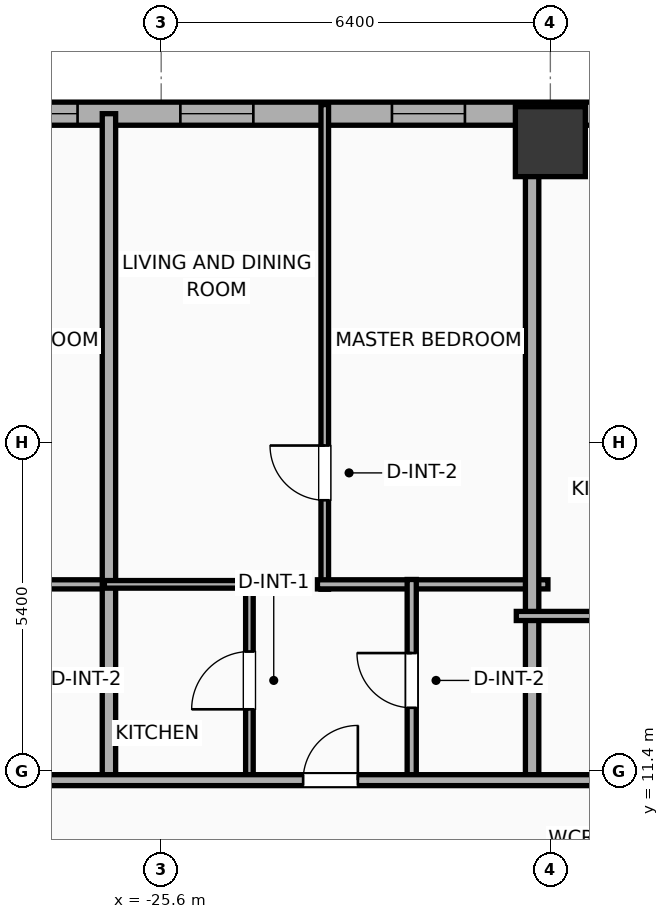
"""IFC4 building model, lengths in metres.
Left out: names, types, materials, properties, quantities, classifications, styles, units other than length and angle.
Written with IfcOpenShell. Run it as: python <this file> out.ifc"""

import sys

from ifc_helpers import new_model, si_unit, direction, frame, frame_2d, origin, origin_2d, place, context, subcontext, project, spatial, rectangle, hollow_rectangle, extrude, element, fill, save


model = new_model("IFC4")
c1 = context("Model", 3, precision=1e-05, world=origin(), true_north=direction((0.0, 1.0)))
c2 = subcontext(c1, "Body", "Model", "MODEL_VIEW")
j1 = project(units=[si_unit("LENGTHUNIT", "METRE"), si_unit("PLANEANGLEUNIT", "RADIAN")], contexts=[c1])
p1 = place(None, origin())
s1 = spatial("IfcSite", under=j1, at=p1, CompositionType="ELEMENT")
p2 = place(p1, origin())
s2 = spatial("IfcBuilding", under=s1, at=p2, CompositionType="ELEMENT")
p3 = place(p2, frame((0.0, 0.0, 76.7)))
s3 = spatial("IfcBuildingStorey", under=s2, at=p3, CompositionType="ELEMENT", Elevation=76.7)
p4 = place(p3, frame((-19.2, 21.75, 0.0), z_axis=(0.0, 0.0, 1.0), x_axis=(1.0, 0.0, 0.0)))
e1 = element("IfcColumn", 1, at=p4, inside=s3, PredefinedType="COLUMN", context=c2, shape_type="SweptSolid", body=[
    extrude(hollow_rectangle(XDim=1.15, YDim=1.15, WallThickness=0.04, at=origin_2d()), origin(), (0.0, 0.0, 1.0), 3.9),
])
p5 = place(p3, frame((-29.581, 22.21, 0.0), z_axis=(0.0, 0.0, 1.0), x_axis=(1.0, 0.0, 0.0)))
e2 = element("IfcWall", 2, at=p5, inside=s3, PredefinedType="ELEMENTEDWALL", context=c2, shape_type="SweptSolid", body=[
    extrude(rectangle(XDim=51.963, YDim=0.38, at=frame_2d((25.981, 0.0))), origin(), (0.0, 0.0, 1.0), 3.6),
])
p6 = place(p5, frame((25.631, 0.0, 0.75)))
e3 = element("IfcOpeningElement", 3, at=p6, cuts=e2, PredefinedType="OPENING", context=c2, shape_type="SweptSolid", body=[
    extrude(rectangle(XDim=2.4, YDim=2.1, at=frame_2d((1.2, 1.05))), frame((0.0, 0.2, 0.0), z_axis=(0.0, -1.0, 0.0), x_axis=(1.0, 0.0, 0.0)), (0.0, 0.0, 1.0), 0.4),
])
p7 = place(p5, frame((42.952, 0.0, 0.75)))
e4 = element("IfcOpeningElement", 4, at=p7, cuts=e2, PredefinedType="OPENING", context=c2, shape_type="SweptSolid", body=[
    extrude(rectangle(XDim=2.4, YDim=2.1, at=frame_2d((1.2, 1.05))), frame((0.0, 0.2, 0.0), z_axis=(0.0, -1.0, 0.0), x_axis=(1.0, 0.0, 0.0)), (0.0, 0.0, 1.0), 0.4),
])
p8 = place(p5, frame((1.406, 0.0, 0.75)))
e5 = element("IfcOpeningElement", 5, at=p8, cuts=e2, PredefinedType="OPENING", context=c2, shape_type="SweptSolid", body=[
    extrude(rectangle(XDim=1.2, YDim=2.05, at=frame_2d((0.6, 1.025))), frame((0.0, 0.2, 0.0), z_axis=(0.0, -1.0, 0.0), x_axis=(1.0, 0.0, 0.0)), (0.0, 0.0, 1.0), 0.4),
])
p9 = place(p5, frame((4.297, 0.0, 0.75)))
e6 = element("IfcOpeningElement", 6, at=p9, cuts=e2, PredefinedType="OPENING", context=c2, shape_type="SweptSolid", body=[
    extrude(rectangle(XDim=1.2, YDim=2.05, at=frame_2d((0.6, 1.025))), frame((0.0, 0.2, 0.0), z_axis=(0.0, -1.0, 0.0), x_axis=(1.0, 0.0, 0.0)), (0.0, 0.0, 1.0), 0.4),
])
p10 = place(p5, frame((7.776, 0.0, 0.75)))
e7 = element("IfcOpeningElement", 7, at=p10, cuts=e2, PredefinedType="OPENING", context=c2, shape_type="SweptSolid", body=[
    extrude(rectangle(XDim=1.2, YDim=2.05, at=frame_2d((0.6, 1.025))), frame((0.0, 0.2, 0.0), z_axis=(0.0, -1.0, 0.0), x_axis=(1.0, 0.0, 0.0)), (0.0, 0.0, 1.0), 0.4),
])
p11 = place(p5, frame((14.036, 0.0, 0.75)))
e8 = element("IfcOpeningElement", 8, at=p11, cuts=e2, PredefinedType="OPENING", context=c2, shape_type="SweptSolid", body=[
    extrude(rectangle(XDim=1.2, YDim=2.05, at=frame_2d((0.6, 1.025))), frame((0.0, 0.2, 0.0), z_axis=(0.0, -1.0, 0.0), x_axis=(1.0, 0.0, 0.0)), (0.0, 0.0, 1.0), 0.4),
])
p12 = place(p5, frame((11.146, 0.0, 0.75)))
e9 = element("IfcOpeningElement", 9, at=p12, cuts=e2, PredefinedType="OPENING", context=c2, shape_type="SweptSolid", body=[
    extrude(rectangle(XDim=1.2, YDim=2.05, at=frame_2d((0.6, 1.025))), frame((0.0, 0.2, 0.0), z_axis=(0.0, -1.0, 0.0), x_axis=(1.0, 0.0, 0.0)), (0.0, 0.0, 1.0), 0.4),
])
p13 = place(p5, frame((18.751, 0.0, 0.75)))
e10 = element("IfcOpeningElement", 10, at=p13, cuts=e2, PredefinedType="OPENING", context=c2, shape_type="SweptSolid", body=[
    extrude(rectangle(XDim=1.2, YDim=2.05, at=frame_2d((0.6, 1.025))), frame((0.0, 0.2, 0.0), z_axis=(0.0, -1.0, 0.0), x_axis=(1.0, 0.0, 0.0)), (0.0, 0.0, 1.0), 0.4),
])
p14 = place(p5, frame((23.647, 0.0, 0.75)))
e11 = element("IfcOpeningElement", 11, at=p14, cuts=e2, PredefinedType="OPENING", context=c2, shape_type="SweptSolid", body=[
    extrude(rectangle(XDim=1.2, YDim=2.05, at=frame_2d((0.6, 1.025))), frame((0.0, 0.2, 0.0), z_axis=(0.0, -1.0, 0.0), x_axis=(1.0, 0.0, 0.0)), (0.0, 0.0, 1.0), 0.4),
])
p15 = place(p5, frame((32.006, 0.0, 0.75)))
e12 = element("IfcOpeningElement", 12, at=p15, cuts=e2, PredefinedType="OPENING", context=c2, shape_type="SweptSolid", body=[
    extrude(rectangle(XDim=1.2, YDim=2.05, at=frame_2d((0.6, 1.025))), frame((0.0, 0.2, 0.0), z_axis=(0.0, -1.0, 0.0), x_axis=(1.0, 0.0, 0.0)), (0.0, 0.0, 1.0), 0.4),
])
p16 = place(p5, frame((34.176, 0.0, 0.75)))
e13 = element("IfcOpeningElement", 13, at=p16, cuts=e2, PredefinedType="OPENING", context=c2, shape_type="SweptSolid", body=[
    extrude(rectangle(XDim=1.2, YDim=2.05, at=frame_2d((0.6, 1.025))), frame((0.0, 0.2, 0.0), z_axis=(0.0, -1.0, 0.0), x_axis=(1.0, 0.0, 0.0)), (0.0, 0.0, 1.0), 0.4),
])
p17 = place(p5, frame((37.063, 0.0, 0.75)))
e14 = element("IfcOpeningElement", 14, at=p17, cuts=e2, PredefinedType="OPENING", context=c2, shape_type="SweptSolid", body=[
    extrude(rectangle(XDim=1.2, YDim=2.05, at=frame_2d((0.6, 1.025))), frame((0.0, 0.2, 0.0), z_axis=(0.0, -1.0, 0.0), x_axis=(1.0, 0.0, 0.0)), (0.0, 0.0, 1.0), 0.4),
])
p18 = place(p5, frame((39.509, 0.0, 0.75)))
e15 = element("IfcOpeningElement", 15, at=p18, cuts=e2, PredefinedType="OPENING", context=c2, shape_type="SweptSolid", body=[
    extrude(rectangle(XDim=1.2, YDim=2.05, at=frame_2d((0.6, 1.025))), frame((0.0, 0.2, 0.0), z_axis=(0.0, -1.0, 0.0), x_axis=(1.0, 0.0, 0.0)), (0.0, 0.0, 1.0), 0.4),
])
p19 = place(p5, frame((46.921, 0.0, 0.75)))
e16 = element("IfcOpeningElement", 16, at=p19, cuts=e2, PredefinedType="OPENING", context=c2, shape_type="SweptSolid", body=[
    extrude(rectangle(XDim=1.2, YDim=2.05, at=frame_2d((0.6, 1.025))), frame((0.0, 0.2, 0.0), z_axis=(0.0, -1.0, 0.0), x_axis=(1.0, 0.0, 0.0)), (0.0, 0.0, 1.0), 0.4),
])
p20 = place(p5, frame((49.55, 0.0, 0.75)))
e17 = element("IfcOpeningElement", 17, at=p20, cuts=e2, PredefinedType="OPENING", context=c2, shape_type="SweptSolid", body=[
    extrude(rectangle(XDim=1.2, YDim=2.05, at=frame_2d((0.6, 1.025))), frame((0.0, 0.2, 0.0), z_axis=(0.0, -1.0, 0.0), x_axis=(1.0, 0.0, 0.0)), (0.0, 0.0, 1.0), 0.4),
])
p21 = place(p3, frame((-29.989, 14.47, 0.0), z_axis=(0.0, 0.0, 1.0), x_axis=(1.0, 0.0, 0.0)))
e18 = element("IfcWall", 18, at=p21, inside=s3, PredefinedType="PLUMBINGWALL", context=c2, shape_type="SweptSolid", body=[
    extrude(rectangle(XDim=3.605, YDim=0.15, at=frame_2d((1.802, 0.0))), origin(), (0.0, 0.0, 1.0), 3.6),
])
p22 = place(p3, frame((-26.459, 11.17, 0.0), z_axis=(0.0, 0.0, 1.0), x_axis=(0.0, 1.0, 0.0)))
e19 = element("IfcWall", 19, at=p22, inside=s3, PredefinedType="PARTITIONING", context=c2, shape_type="SweptSolid", body=[
    extrude(rectangle(XDim=11.04, YDim=0.22, at=frame_2d((5.52, 0.0))), origin(), (0.0, 0.0, 1.0), 3.6),
])
p23 = place(p3, frame((-22.91, 14.39, 0.0), z_axis=(0.0, 0.0, 1.0), x_axis=(0.0, 1.0, 0.0)))
e20 = element("IfcWall", 20, at=p23, inside=s3, PredefinedType="PARTITIONING", context=c2, shape_type="SweptSolid", body=[
    extrude(rectangle(XDim=7.97, YDim=0.125, at=frame_2d((3.985, 0.0))), origin(), (0.0, 0.0, 1.0), 3.6),
])
p24 = place(p23, frame((1.463, 0.0, 0.0)))
e21 = element("IfcOpeningElement", 21, at=p24, cuts=e20, PredefinedType="OPENING", context=c2, shape_type="SweptSolid", body=[
    extrude(rectangle(XDim=0.9, YDim=2.05, at=frame_2d((0.45, 1.025))), frame((0.0, 0.073, 0.0), z_axis=(0.0, -1.0, 0.0), x_axis=(1.0, 0.0, 0.0)), (0.0, 0.0, 1.0), 0.145),
])
p25 = place(p3, frame((-23.03, 14.47, 0.0), z_axis=(0.0, 0.0, 1.0), x_axis=(1.0, 0.0, 0.0)))
e22 = element("IfcWall", 22, at=p25, inside=s3, PredefinedType="PLUMBINGWALL", context=c2, shape_type="SweptSolid", body=[
    extrude(rectangle(XDim=3.79, YDim=0.15, at=frame_2d((1.895, 0.0))), origin(), (0.0, 0.0, 1.0), 3.6),
])
p26 = place(p3, frame((-24.149, 11.23, 0.0), z_axis=(0.0, 0.0, 1.0), x_axis=(0.0, 1.0, 0.0)))
e23 = element("IfcWall", 23, at=p26, inside=s3, PredefinedType="PARTITIONING", context=c2, shape_type="SweptSolid", body=[
    extrude(rectangle(XDim=3.32, YDim=0.125, at=frame_2d((1.66, 0.0))), origin(), (0.0, 0.0, 1.0), 3.6),
])
p27 = place(p26, frame((1.185, 0.0, 0.0)))
e24 = element("IfcOpeningElement", 24, at=p27, cuts=e23, PredefinedType="OPENING", context=c2, shape_type="SweptSolid", body=[
    extrude(rectangle(XDim=0.95, YDim=2.05, at=frame_2d((0.475, 1.025))), frame((0.0, 0.073, 0.0), z_axis=(0.0, -1.0, 0.0), x_axis=(1.0, 0.0, 0.0)), (0.0, 0.0, 1.0), 0.145),
])
p28 = place(p3, frame((-26.534, 14.47, 0.0), z_axis=(0.0, 0.0, 1.0), x_axis=(1.0, 0.0, 0.0)))
e25 = element("IfcWall", 25, at=p28, inside=s3, PredefinedType="PARTITIONING", context=c2, shape_type="SweptSolid", body=[
    extrude(rectangle(XDim=2.505, YDim=0.125, at=frame_2d((1.252, 0.0))), origin(), (0.0, 0.0, 1.0), 3.6),
])
p29 = place(p3, frame((-21.48, 11.23, 0.0), z_axis=(0.0, 0.0, 1.0), x_axis=(0.0, 1.0, 0.0)))
e26 = element("IfcWall", 26, at=p29, inside=s3, PredefinedType="PLUMBINGWALL", context=c2, shape_type="SweptSolid", body=[
    extrude(rectangle(XDim=3.32, YDim=0.15, at=frame_2d((1.66, 0.0))), origin(), (0.0, 0.0, 1.0), 3.6),
])
p30 = place(p29, frame((1.21, 0.0, 0.0)))
e27 = element("IfcOpeningElement", 27, at=p30, cuts=e26, PredefinedType="OPENING", context=c2, shape_type="SweptSolid", body=[
    extrude(rectangle(XDim=0.9, YDim=2.05, at=frame_2d((0.45, 1.025))), frame((0.0, 0.085, 0.0), z_axis=(0.0, -1.0, 0.0), x_axis=(1.0, 0.0, 0.0)), (0.0, 0.0, 1.0), 0.17),
])
p31 = place(p3, frame((-19.5, 11.17, 0.0), z_axis=(0.0, 0.0, 1.0), x_axis=(0.0, 1.0, 0.0)))
e28 = element("IfcWall", 28, at=p31, inside=s3, PredefinedType="PARTITIONING", context=c2, shape_type="SweptSolid", body=[
    extrude(rectangle(XDim=11.04, YDim=0.22, at=frame_2d((5.52, 0.0))), origin(), (0.0, 0.0, 1.0), 2.89),
])
p32 = place(p3, frame((-19.76, 13.95, 0.0), z_axis=(0.0, 0.0, 1.0), x_axis=(1.0, 0.0, 0.0)))
e29 = element("IfcWall", 29, at=p32, inside=s3, PredefinedType="PLUMBINGWALL", context=c2, shape_type="SweptSolid", body=[
    extrude(rectangle(XDim=2.95, YDim=0.15, at=frame_2d((1.475, 0.0))), origin(), (0.0, 0.0, 1.0), 3.6),
])
p33 = place(p3, frame((-33.41, 11.25, 0.0), z_axis=(0.0, 0.0, 1.0), x_axis=(1.0, 0.0, 0.0)))
e30 = element("IfcWall", 30, at=p33, inside=s3, PredefinedType="PARTITIONING", context=c2, shape_type="SweptSolid", body=[
    extrude(rectangle(XDim=59.62, YDim=0.18, at=frame_2d((29.81, 0.0))), origin(), (0.0, 0.0, 1.0), 3.6),
])
p34 = place(p33, frame((3.157, 0.0, 0.0)))
e31 = element("IfcOpeningElement", 31, at=p34, cuts=e30, PredefinedType="OPENING", context=c2, shape_type="SweptSolid", body=[
    extrude(rectangle(XDim=0.9, YDim=2.05, at=frame_2d((0.45, 1.025))), frame((0.0, 0.1, 0.0), z_axis=(0.0, -1.0, 0.0), x_axis=(1.0, 0.0, 0.0)), (0.0, 0.0, 1.0), 0.2),
])
p35 = place(p33, frame((10.145, 0.0, 0.0)))
e32 = element("IfcOpeningElement", 32, at=p35, cuts=e30, PredefinedType="OPENING", context=c2, shape_type="SweptSolid", body=[
    extrude(rectangle(XDim=0.9, YDim=2.05, at=frame_2d((0.45, 1.025))), frame((0.0, 0.1, 0.0), z_axis=(0.0, -1.0, 0.0), x_axis=(1.0, 0.0, 0.0)), (0.0, 0.0, 1.0), 0.2),
])
p36 = place(p33, frame((17.86, 0.0, 0.0)))
e33 = element("IfcOpeningElement", 33, at=p36, cuts=e30, PredefinedType="OPENING", context=c2, shape_type="SweptSolid", body=[
    extrude(rectangle(XDim=1.15, YDim=2.05, at=frame_2d((0.575, 1.025))), frame((0.0, 0.1, 0.0), z_axis=(0.0, -1.0, 0.0), x_axis=(1.0, 0.0, 0.0)), (0.0, 0.0, 1.0), 0.2),
])
p37 = place(p33, frame((23.338, 0.0, 0.0)))
e34 = element("IfcOpeningElement", 34, at=p37, cuts=e30, PredefinedType="OPENING", context=c2, shape_type="SweptSolid", body=[
    extrude(rectangle(XDim=0.9, YDim=2.05, at=frame_2d((0.45, 1.025))), frame((0.0, 0.1, 0.0), z_axis=(0.0, -1.0, 0.0), x_axis=(1.0, 0.0, 0.0)), (0.0, 0.0, 1.0), 0.2),
])
p38 = place(p33, frame((30.719, 0.0, 0.0)))
e35 = element("IfcOpeningElement", 35, at=p38, cuts=e30, PredefinedType="OPENING", context=c2, shape_type="SweptSolid", body=[
    extrude(rectangle(XDim=1.15, YDim=2.05, at=frame_2d((0.575, 1.025))), frame((0.0, 0.1, 0.0), z_axis=(0.0, -1.0, 0.0), x_axis=(1.0, 0.0, 0.0)), (0.0, 0.0, 1.0), 0.2),
])
p39 = place(p33, frame((34.81, 0.0, 0.0)))
e36 = element("IfcOpeningElement", 36, at=p39, cuts=e30, PredefinedType="OPENING", context=c2, shape_type="SweptSolid", body=[
    extrude(rectangle(XDim=1.15, YDim=2.05, at=frame_2d((0.575, 1.025))), frame((0.0, 0.1, 0.0), z_axis=(0.0, -1.0, 0.0), x_axis=(1.0, 0.0, 0.0)), (0.0, 0.0, 1.0), 0.2),
])
p40 = place(p33, frame((42.912, 0.0, 0.0)))
e37 = element("IfcOpeningElement", 37, at=p40, cuts=e30, PredefinedType="OPENING", context=c2, shape_type="SweptSolid", body=[
    extrude(rectangle(XDim=0.9, YDim=2.05, at=frame_2d((0.45, 1.025))), frame((0.0, 0.1, 0.0), z_axis=(0.0, -1.0, 0.0), x_axis=(1.0, 0.0, 0.0)), (0.0, 0.0, 1.0), 0.2),
])
p41 = place(p33, frame((49.482, 0.0, 0.0)))
e38 = element("IfcOpeningElement", 38, at=p41, cuts=e30, PredefinedType="OPENING", context=c2, shape_type="SweptSolid", body=[
    extrude(rectangle(XDim=0.9, YDim=2.05, at=frame_2d((0.45, 1.025))), frame((0.0, 0.1, 0.0), z_axis=(0.0, -1.0, 0.0), x_axis=(1.0, 0.0, 0.0)), (0.0, 0.0, 1.0), 0.2),
])
p42 = place(p33, frame((56.088, 0.0, 0.0)))
e39 = element("IfcOpeningElement", 39, at=p42, cuts=e30, PredefinedType="OPENING", context=c2, shape_type="SweptSolid", body=[
    extrude(rectangle(XDim=0.9, YDim=2.05, at=frame_2d((0.45, 1.025))), frame((0.0, 0.1, 0.0), z_axis=(0.0, -1.0, 0.0), x_axis=(1.0, 0.0, 0.0)), (0.0, 0.0, 1.0), 0.2),
])
p43 = place(p8, origin())
e40 = element("IfcWindow", 40, at=p43, inside=s3, PartitioningType="SINGLE_PANEL", PredefinedType="WINDOW", context=c2, shape_type="SweptSolid", body=[
    extrude(rectangle(XDim=1.2, YDim=2.05, at=frame_2d((0.6, 1.025))), frame((0.0, 0.03, 0.0), z_axis=(0.0, -1.0, 0.0), x_axis=(1.0, 0.0, 0.0)), (0.0, 0.0, 1.0), 0.06),
])
fill(e5, e40)
p44 = place(p9, origin())
e41 = element("IfcWindow", 41, at=p44, inside=s3, PartitioningType="SINGLE_PANEL", PredefinedType="WINDOW", context=c2, shape_type="SweptSolid", body=[
    extrude(rectangle(XDim=1.2, YDim=2.05, at=frame_2d((0.6, 1.025))), frame((0.0, 0.03, 0.0), z_axis=(0.0, -1.0, 0.0), x_axis=(1.0, 0.0, 0.0)), (0.0, 0.0, 1.0), 0.06),
])
fill(e6, e41)
p45 = place(p10, origin())
e42 = element("IfcWindow", 42, at=p45, inside=s3, PartitioningType="SINGLE_PANEL", PredefinedType="WINDOW", context=c2, shape_type="SweptSolid", body=[
    extrude(rectangle(XDim=1.2, YDim=2.05, at=frame_2d((0.6, 1.025))), frame((0.0, 0.03, 0.0), z_axis=(0.0, -1.0, 0.0), x_axis=(1.0, 0.0, 0.0)), (0.0, 0.0, 1.0), 0.06),
])
fill(e7, e42)
p46 = place(p24, origin())
e43 = element("IfcDoor", 43, at=p46, inside=s3, OperationType="SINGLE_SWING_RIGHT", PredefinedType="DOOR", context=c2, shape_type="SweptSolid", body=[
    extrude(rectangle(XDim=0.9, YDim=2.05, at=frame_2d((0.45, 1.025))), frame((0.0, 0.025, 0.0), z_axis=(0.0, -1.0, 0.0), x_axis=(1.0, 0.0, 0.0)), (0.0, 0.0, 1.0), 0.05),
])
fill(e21, e43)
p47 = place(p27, origin())
e44 = element("IfcDoor", 44, at=p47, inside=s3, OperationType="SINGLE_SWING_LEFT", PredefinedType="DOOR", context=c2, shape_type="SweptSolid", body=[
    extrude(rectangle(XDim=0.95, YDim=2.05, at=frame_2d((0.475, 1.025))), frame((0.0, 0.025, 0.0), z_axis=(0.0, -1.0, 0.0), x_axis=(1.0, 0.0, 0.0)), (0.0, 0.0, 1.0), 0.05),
])
fill(e24, e44)
p48 = place(p30, origin())
e45 = element("IfcDoor", 45, at=p48, inside=s3, OperationType="SINGLE_SWING_RIGHT", PredefinedType="DOOR", context=c2, shape_type="SweptSolid", body=[
    extrude(rectangle(XDim=0.9, YDim=2.05, at=frame_2d((0.45, 1.025))), frame((0.0, 0.025, 0.0), z_axis=(0.0, -1.0, 0.0), x_axis=(1.0, 0.0, 0.0)), (0.0, 0.0, 1.0), 0.05),
])
fill(e27, e45)
p49 = place(p35, origin())
e46 = element("IfcDoor", 46, at=p49, inside=s3, OperationType="SINGLE_SWING_RIGHT", PredefinedType="DOOR", context=c2, shape_type="SweptSolid", body=[
    extrude(rectangle(XDim=0.9, YDim=2.05, at=frame_2d((0.45, 1.025))), frame((0.0, 0.025, 0.0), z_axis=(0.0, -1.0, 0.0), x_axis=(1.0, 0.0, 0.0)), (0.0, 0.0, 1.0), 0.05),
])
fill(e32, e46)
save(model, sys.argv[1])
